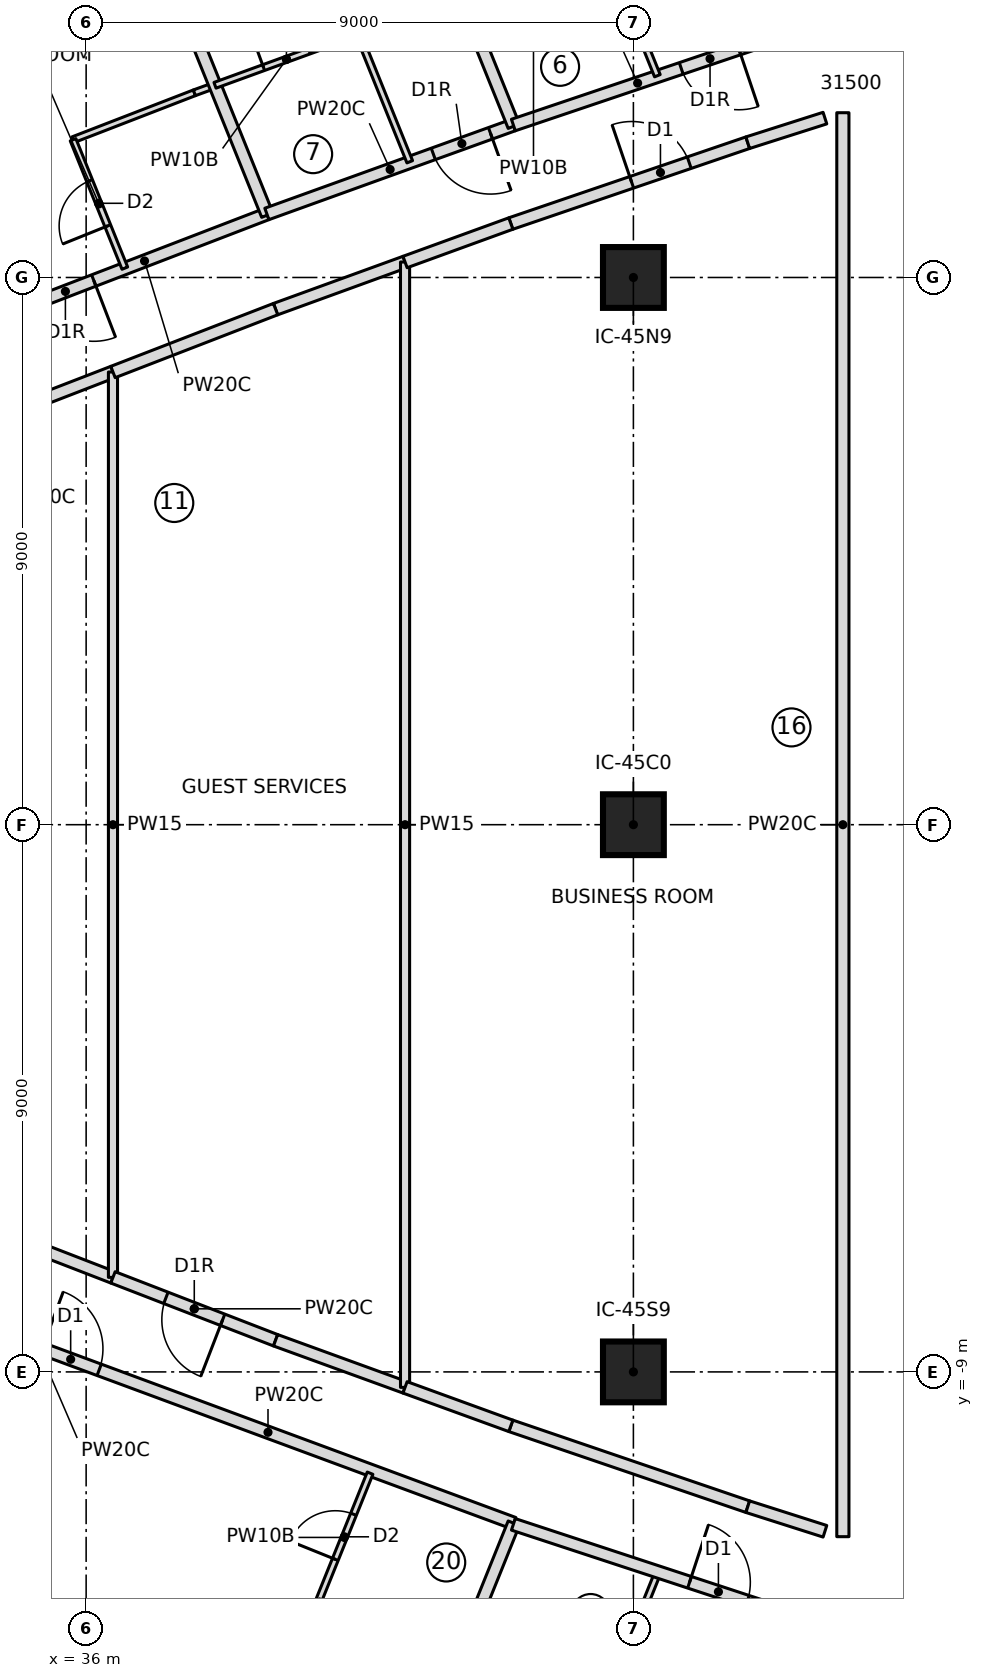
"""IFC4 building model, lengths in metres.
Left out: names, types, materials, properties, quantities, classifications, styles, units other than length and angle.
Written with IfcOpenShell. Run it as: python <this file> out.ifc"""

import sys

from ifc_helpers import new_model, si_unit, direction, frame, frame_2d, origin, origin_2d, place, context, subcontext, project, spatial, rectangle, extrude, element, fill, save


model = new_model("IFC4")
c1 = context("Model", 3, precision=1e-05, world=origin(), true_north=direction((0.0, 1.0)))
c2 = subcontext(c1, "Body", "Model", "MODEL_VIEW")
j1 = project(units=[si_unit("LENGTHUNIT", "METRE"), si_unit("PLANEANGLEUNIT", "RADIAN")], contexts=[c1])
p1 = place(None, origin())
s1 = spatial("IfcSite", under=j1, at=p1, CompositionType="ELEMENT")
p2 = place(p1, origin())
s2 = spatial("IfcBuilding", under=s1, at=p2, CompositionType="ELEMENT")
p3 = place(p2, frame((0.0, 0.0, 207.45)))
s3 = spatial("IfcBuildingStorey", under=s2, at=p3, CompositionType="ELEMENT", Elevation=207.45)
for number, where, z_axis, x_axis in (
    (1, (45.0, -9.0, 0.0), (0.0, 0.0, 1.0), (1.0, 0.0, 0.0)),
    (2, (45.0, 0.0, 0.0), (0.0, 0.0, 1.0), (1.0, 0.0, 0.0)),
    (3, (45.0, 9.0, 0.0), (0.0, 0.0, 1.0), (1.0, 0.0, 0.0)),
):
    element("IfcColumn", number, at=place(p3, frame(where, z_axis=z_axis, x_axis=x_axis)), inside=s3, PredefinedType="COLUMN", context=c2, shape_type="SweptSolid", body=[
        extrude(rectangle(XDim=1.0, YDim=1.0, at=origin_2d()), origin(), (0.0, 0.0, 1.0), 3.55),
    ])
p4 = place(p3, frame((38.972, 10.045, 0.0), z_axis=(0.0, 0.0, 1.0), x_axis=(-0.93335728106, -0.358948723208, 0.0)))
e4 = element("IfcWall", 4, at=p4, inside=s3, PredefinedType="PARTITIONING", context=c2, shape_type="SweptSolid", body=[
    extrude(rectangle(XDim=4.312, YDim=0.2, at=frame_2d((2.156, 0.0))), origin(), (0.0, 0.0, 1.0), 3.15),
])
p5 = place(p4, frame((3.05, 0.0, 0.0)))
e5 = element("IfcOpeningElement", 5, at=p5, cuts=e4, PredefinedType="OPENING", context=c2, shape_type="SweptSolid", body=[
    extrude(rectangle(XDim=1.0, YDim=2.1, at=frame_2d((0.5, 1.05))), frame((0.0, 0.11, 0.0), z_axis=(0.0, -1.0, 0.0), x_axis=(1.0, 0.0, 0.0)), (0.0, 0.0, 1.0), 0.22),
])
p6 = place(p3, frame((35.785, 11.266, 0.0), z_axis=(0.0, 0.0, 1.0), x_axis=(0.932673396793, 0.360721963448, 0.0)))
e6 = element("IfcWall", 6, at=p6, inside=s3, PredefinedType="PARTITIONING", context=c2, shape_type="SweptSolid", body=[
    extrude(rectangle(XDim=2.139, YDim=0.1, at=frame_2d((1.07, 0.0))), origin(), (0.0, 0.0, 1.0), 3.15),
])
p7 = place(p3, frame((37.78, 12.037, 0.0), z_axis=(0.0, 0.0, 1.0), x_axis=(0.939595761479, 0.34228614493, 0.0)))
e7 = element("IfcWall", 7, at=p7, inside=s3, PredefinedType="PARTITIONING", context=c2, shape_type="SweptSolid", body=[
    extrude(rectangle(XDim=0.361, YDim=0.1, at=frame_2d((0.18, 0.0))), origin(), (0.0, 0.0, 1.0), 3.15),
])
p8 = place(p3, frame((36.636, 9.154, 0.0), z_axis=(0.0, 0.0, 1.0), x_axis=(-0.373885031976, 0.927475057813, 0.0)))
e8 = element("IfcWall", 8, at=p8, inside=s3, PredefinedType="PARTITIONING", context=c2, shape_type="SweptSolid", body=[
    extrude(rectangle(XDim=2.277, YDim=0.1, at=frame_2d((1.138, 0.0))), origin(), (0.0, 0.0, 1.0), 3.15),
])
p9 = place(p8, frame((0.75, 0.0, 0.0)))
e9 = element("IfcOpeningElement", 9, at=p9, cuts=e8, PredefinedType="OPENING", context=c2, shape_type="SweptSolid", body=[
    extrude(rectangle(XDim=0.8, YDim=2.1, at=frame_2d((0.4, 1.05))), frame((0.0, 0.06, 0.0), z_axis=(0.0, -1.0, 0.0), x_axis=(1.0, 0.0, 0.0)), (0.0, 0.0, 1.0), 0.12),
])
p10 = place(p3, frame((38.98, 10.026, 0.0), z_axis=(0.0, 0.0, 1.0), x_axis=(-0.373863662938, 0.927483671843, 0.0)))
e10 = element("IfcWall", 10, at=p10, inside=s3, PredefinedType="PARTITIONING", context=c2, shape_type="SweptSolid", body=[
    extrude(rectangle(XDim=7.604, YDim=0.2, at=frame_2d((3.802, 0.0))), origin(), (0.0, 0.0, 1.0), 3.15),
])
p11 = place(p3, frame((43.026, 11.507, 0.0), z_axis=(0.0, 0.0, 1.0), x_axis=(-0.940653905433, -0.339367397069, 0.0)))
e11 = element("IfcWall", 11, at=p11, inside=s3, PredefinedType="PARTITIONING", context=c2, shape_type="SweptSolid", body=[
    extrude(rectangle(XDim=4.309, YDim=0.2, at=frame_2d((2.155, 0.0))), origin(), (0.0, 0.0, 1.0), 3.15),
])
p12 = place(p11, frame((0.4, 0.0, 0.0)))
e12 = element("IfcOpeningElement", 12, at=p12, cuts=e11, PredefinedType="OPENING", context=c2, shape_type="SweptSolid", body=[
    extrude(rectangle(XDim=1.0, YDim=2.1, at=frame_2d((0.5, 1.05))), frame((0.0, 0.11, 0.0), z_axis=(0.0, -1.0, 0.0), x_axis=(1.0, 0.0, 0.0)), (0.0, 0.0, 1.0), 0.22),
])
p13 = place(p3, frame((38.119, 12.161, 0.0), z_axis=(0.0, 0.0, 1.0), x_axis=(0.939744972593, 0.341876273652, 0.0)))
e13 = element("IfcWall", 13, at=p13, inside=s3, PredefinedType="PARTITIONING", context=c2, shape_type="SweptSolid", body=[
    extrude(rectangle(XDim=2.501, YDim=0.1, at=frame_2d((1.251, 0.0))), origin(), (0.0, 0.0, 1.0), 3.15),
])
p14 = place(p13, frame((0.85, 0.0, 0.0)))
e14 = element("IfcOpeningElement", 14, at=p14, cuts=e13, PredefinedType="OPENING", context=c2, shape_type="SweptSolid", body=[
    extrude(rectangle(XDim=0.8, YDim=2.1, at=frame_2d((0.4, 1.05))), frame((0.0, 0.06, 0.0), z_axis=(0.0, -1.0, 0.0), x_axis=(1.0, 0.0, 0.0)), (0.0, 0.0, 1.0), 0.12),
])
p15 = place(p3, frame((40.47, 13.016, 0.0), z_axis=(0.0, 0.0, 1.0), x_axis=(0.373846436826, -0.927490615409, 0.0)))
e15 = element("IfcWall", 15, at=p15, inside=s3, PredefinedType="PARTITIONING", context=c2, shape_type="SweptSolid", body=[
    extrude(rectangle(XDim=2.279, YDim=0.1, at=frame_2d((1.139, 0.0))), origin(), (0.0, 0.0, 1.0), 3.15),
])
p16 = place(p3, frame((43.033, 11.489, 0.0), z_axis=(0.0, 0.0, 1.0), x_axis=(-0.373877998371, 0.927477893178, 0.0)))
e16 = element("IfcWall", 16, at=p16, inside=s3, PredefinedType="PARTITIONING", context=c2, shape_type="SweptSolid", body=[
    extrude(rectangle(XDim=7.611, YDim=0.2, at=frame_2d((3.806, 0.0))), origin(), (0.0, 0.0, 1.0), 3.15),
])
p17 = place(p3, frame((47.113, 12.886, 0.0), z_axis=(0.0, 0.0, 1.0), x_axis=(-0.947550995841, -0.319604615549, 0.0)))
e17 = element("IfcWall", 17, at=p17, inside=s3, PredefinedType="PARTITIONING", context=c2, shape_type="SweptSolid", body=[
    extrude(rectangle(XDim=4.314, YDim=0.2, at=frame_2d((2.157, 0.0))), origin(), (0.0, 0.0, 1.0), 3.15),
])
p18 = place(p17, frame((0.4, 0.0, 0.0)))
e18 = element("IfcOpeningElement", 18, at=p18, cuts=e17, PredefinedType="OPENING", context=c2, shape_type="SweptSolid", body=[
    extrude(rectangle(XDim=1.0, YDim=2.1, at=frame_2d((0.5, 1.05))), frame((0.0, 0.11, 0.0), z_axis=(0.0, -1.0, 0.0), x_axis=(1.0, 0.0, 0.0)), (0.0, 0.0, 1.0), 0.22),
])
p19 = place(p3, frame((44.542, 14.434, 0.0), z_axis=(0.0, 0.0, 1.0), x_axis=(0.373917841166, -0.927461831052, 0.0)))
e19 = element("IfcWall", 19, at=p19, inside=s3, PredefinedType="PARTITIONING", context=c2, shape_type="SweptSolid", body=[
    extrude(rectangle(XDim=2.281, YDim=0.1, at=frame_2d((1.14, 0.0))), origin(), (0.0, 0.0, 1.0), 3.15),
])
p20 = place(p3, frame((34.948, -8.497, 0.0), z_axis=(0.0, 0.0, 1.0), x_axis=(0.937864515454, -0.347001657996, 0.0)))
e20 = element("IfcWall", 20, at=p20, inside=s3, PredefinedType="PARTITIONING", context=c2, shape_type="SweptSolid", body=[
    extrude(rectangle(XDim=8.621, YDim=0.2, at=frame_2d((4.311, 0.0))), origin(), (0.0, 0.0, 1.0), 3.15),
])
p21 = place(p20, frame((0.35, 0.0, 0.0)))
e21 = element("IfcOpeningElement", 21, at=p21, cuts=e20, PredefinedType="OPENING", context=c2, shape_type="SweptSolid", body=[
    extrude(rectangle(XDim=1.0, YDim=2.1, at=frame_2d((0.5, 1.05))), frame((0.0, 0.11, 0.0), z_axis=(0.0, -1.0, 0.0), x_axis=(1.0, 0.0, 0.0)), (0.0, 0.0, 1.0), 0.22),
])
p22 = place(p3, frame((39.818, -12.779, 0.0), z_axis=(0.0, 0.0, 1.0), x_axis=(0.373883593317, 0.927475637765, 0.0)))
e22 = element("IfcWall", 22, at=p22, inside=s3, PredefinedType="PARTITIONING", context=c2, shape_type="SweptSolid", body=[
    extrude(rectangle(XDim=2.278, YDim=0.1, at=frame_2d((1.139, 0.0))), origin(), (0.0, 0.0, 1.0), 3.15),
])
p23 = place(p22, frame((0.75, 0.0, 0.0)))
e23 = element("IfcOpeningElement", 23, at=p23, cuts=e22, PredefinedType="OPENING", context=c2, shape_type="SweptSolid", body=[
    extrude(rectangle(XDim=0.8, YDim=2.1, at=frame_2d((0.4, 1.05))), frame((0.0, 0.06, 0.0), z_axis=(0.0, -1.0, 0.0), x_axis=(1.0, 0.0, 0.0)), (0.0, 0.0, 1.0), 0.12),
])
p24 = place(p3, frame((40.188, -18.548, 0.0), z_axis=(0.0, 0.0, 1.0), x_axis=(0.373877998371, 0.927477893178, 0.0)))
e24 = element("IfcWall", 24, at=p24, inside=s3, PredefinedType="PARTITIONING", context=c2, shape_type="SweptSolid", body=[
    extrude(rectangle(XDim=7.611, YDim=0.2, at=frame_2d((3.806, 0.0))), origin(), (0.0, 0.0, 1.0), 3.15),
])
p25 = place(p3, frame((45.395, -12.318, 0.0), z_axis=(0.0, 0.0, 1.0), x_axis=(-0.373917841166, -0.927461831052, 0.0)))
e25 = element("IfcWall", 25, at=p25, inside=s3, PredefinedType="PARTITIONING", context=c2, shape_type="SweptSolid", body=[
    extrude(rectangle(XDim=2.281, YDim=0.1, at=frame_2d((1.14, 0.0))), origin(), (0.0, 0.0, 1.0), 3.15),
])
for number, where, z_axis, x_axis in (
    (26, (35.276, 6.994, 0.0), (0.0, 0.0, 1.0), (0.933, 0.361, 0.0)),
    (27, (36.441, -7.445, 0.0), (0.0, 0.0, 1.0), (-0.933, 0.361, 0.0)),
):
    element("IfcWall", number, at=place(p3, frame(where, z_axis=z_axis, x_axis=x_axis)), inside=s3, PredefinedType="PARTITIONING", context=c2, shape_type="SweptSolid", body=[
        extrude(rectangle(XDim=1.25, YDim=0.2, at=frame_2d((0.625, 0.0))), origin(), (0.0, 0.0, 1.0), 3.15),
    ])
p26 = place(p3, frame((36.441, -7.445, 0.0), z_axis=(0.0, 0.0, 1.0), x_axis=(0.0, 1.0, 0.0)))
e28 = element("IfcWall", 28, at=p26, inside=s3, PredefinedType="PARTITIONING", context=c2, shape_type="SweptSolid", body=[
    extrude(rectangle(XDim=14.89, YDim=0.15, at=frame_2d((7.445, 0.0))), origin(), (0.0, 0.0, 1.0), 3.15),
])
p27 = place(p3, frame((39.115, -8.479, 0.0), z_axis=(0.0, 0.0, 1.0), x_axis=(-0.932650373077, 0.36078148733, 0.0)))
e29 = element("IfcWall", 29, at=p27, inside=s3, PredefinedType="PARTITIONING", context=c2, shape_type="SweptSolid", body=[
    extrude(rectangle(XDim=2.867, YDim=0.2, at=frame_2d((1.434, 0.0))), origin(), (0.0, 0.0, 1.0), 3.15),
])
p28 = place(p27, frame((0.934, 0.0, 0.0)))
e30 = element("IfcOpeningElement", 30, at=p28, cuts=e29, PredefinedType="OPENING", context=c2, shape_type="SweptSolid", body=[
    extrude(rectangle(XDim=1.0, YDim=2.1, at=frame_2d((0.5, 1.05))), frame((0.0, 0.11, 0.0), z_axis=(0.0, -1.0, 0.0), x_axis=(1.0, 0.0, 0.0)), (0.0, 0.0, 1.0), 0.22),
])
for number, where, z_axis, x_axis in (
    (31, (39.115, 8.479, 0.0), (0.0, 0.0, 1.0), (0.94, 0.342, 0.0)),
    (32, (41.245, -9.254, 0.0), (0.0, 0.0, 1.0), (-0.94, 0.342, 0.0)),
):
    element("IfcWall", number, at=place(p3, frame(where, z_axis=z_axis, x_axis=x_axis)), inside=s3, PredefinedType="PARTITIONING", context=c2, shape_type="SweptSolid", body=[
        extrude(rectangle(XDim=2.266, YDim=0.2, at=frame_2d((1.133, 0.0))), origin(), (0.0, 0.0, 1.0), 3.15),
    ])
p29 = place(p3, frame((36.441, 7.445, 0.0), z_axis=(0.0, 0.0, 1.0), x_axis=(0.932650373077, 0.36078148733, 0.0)))
e33 = element("IfcWall", 33, at=p29, inside=s3, PredefinedType="PARTITIONING", context=c2, shape_type="SweptSolid", body=[
    extrude(rectangle(XDim=2.867, YDim=0.2, at=frame_2d((1.434, 0.0))), origin(), (0.0, 0.0, 1.0), 3.15),
])
p30 = place(p3, frame((41.245, -9.254, 0.0), z_axis=(0.0, 0.0, 1.0), x_axis=(0.0, 1.0, 0.0)))
e34 = element("IfcWall", 34, at=p30, inside=s3, PredefinedType="PARTITIONING", context=c2, shape_type="SweptSolid", body=[
    extrude(rectangle(XDim=18.508, YDim=0.15, at=frame_2d((9.254, 0.0))), origin(), (0.0, 0.0, 1.0), 3.15),
])
p31 = place(p3, frame((42.984, 9.887, 0.0), z_axis=(0.0, 0.0, 1.0), x_axis=(0.946436071896, 0.322891253852, 0.0)))
e35 = element("IfcWall", 35, at=p31, inside=s3, PredefinedType="PARTITIONING", context=c2, shape_type="SweptSolid", body=[
    extrude(rectangle(XDim=4.117, YDim=0.2, at=frame_2d((2.059, 0.0))), origin(), (0.0, 0.0, 1.0), 3.15),
])
p32 = place(p31, frame((2.1, 0.0, 0.0)))
e36 = element("IfcOpeningElement", 36, at=p32, cuts=e35, PredefinedType="OPENING", context=c2, shape_type="SweptSolid", body=[
    extrude(rectangle(XDim=1.0, YDim=2.1, at=frame_2d((0.5, 1.05))), frame((0.0, 0.11, 0.0), z_axis=(0.0, -1.0, 0.0), x_axis=(1.0, 0.0, 0.0)), (0.0, 0.0, 1.0), 0.22),
])
p33 = place(p3, frame((46.881, -11.217, 0.0), z_axis=(0.0, 0.0, 1.0), x_axis=(-0.946436071896, 0.322891253852, 0.0)))
e37 = element("IfcWall", 37, at=p33, inside=s3, PredefinedType="PARTITIONING", context=c2, shape_type="SweptSolid", body=[
    extrude(rectangle(XDim=4.117, YDim=0.2, at=frame_2d((2.059, 0.0))), origin(), (0.0, 0.0, 1.0), 3.15),
])
for number, where, z_axis, x_axis in (
    (38, (42.984, -9.887, 0.0), (0.0, 0.0, 1.0), (-0.94, 0.342, 0.0)),
    (39, (41.245, 9.254, 0.0), (0.0, 0.0, 1.0), (0.94, 0.342, 0.0)),
):
    element("IfcWall", number, at=place(p3, frame(where, z_axis=z_axis, x_axis=x_axis)), inside=s3, PredefinedType="PARTITIONING", context=c2, shape_type="SweptSolid", body=[
        extrude(rectangle(XDim=1.851, YDim=0.2, at=frame_2d((0.926, 0.0))), origin(), (0.0, 0.0, 1.0), 3.15),
    ])
p34 = place(p3, frame((43.026, -11.507, 0.0), z_axis=(0.0, 0.0, 1.0), x_axis=(0.949951949432, -0.312396052744, 0.0)))
e40 = element("IfcWall", 40, at=p34, inside=s3, PredefinedType="PARTITIONING", context=c2, shape_type="SweptSolid", body=[
    extrude(rectangle(XDim=5.394, YDim=0.2, at=frame_2d((2.697, 0.0))), origin(), (0.0, 0.0, 1.0), 3.15),
])
p35 = place(p34, frame((3.05, 0.0, 0.0)))
e41 = element("IfcOpeningElement", 41, at=p35, cuts=e40, PredefinedType="OPENING", context=c2, shape_type="SweptSolid", body=[
    extrude(rectangle(XDim=1.0, YDim=2.1, at=frame_2d((0.5, 1.05))), frame((0.0, 0.11, 0.0), z_axis=(0.0, -1.0, 0.0), x_axis=(1.0, 0.0, 0.0)), (0.0, 0.0, 1.0), 0.22),
])
for number, where, z_axis, x_axis in (
    (42, (46.881, 11.217, 0.0), (0.0, 0.0, 1.0), (0.953, 0.304, 0.0)),
    (43, (48.15, -11.621, 0.0), (0.0, 0.0, 1.0), (-0.953, 0.304, 0.0)),
):
    element("IfcWall", number, at=place(p3, frame(where, z_axis=z_axis, x_axis=x_axis)), inside=s3, PredefinedType="PARTITIONING", context=c2, shape_type="SweptSolid", body=[
        extrude(rectangle(XDim=1.332, YDim=0.2, at=frame_2d((0.666, 0.0))), origin(), (0.0, 0.0, 1.0), 3.15),
    ])
p36 = place(p3, frame((48.445, 11.71, 0.0), z_axis=(0.0, 0.0, 1.0), x_axis=(0.0, -1.0, 0.0)))
e44 = element("IfcWall", 44, at=p36, inside=s3, PredefinedType="PARTITIONING", context=c2, shape_type="SweptSolid", body=[
    extrude(rectangle(XDim=23.42, YDim=0.2, at=frame_2d((11.71, 0.0))), origin(), (0.0, 0.0, 1.0), 3.15),
])
p37 = place(p9, origin())
e45 = element("IfcDoor", 45, at=p37, inside=s3, OperationType="SINGLE_SWING_LEFT", PredefinedType="DOOR", context=c2, shape_type="SweptSolid", body=[
    extrude(rectangle(XDim=0.8, YDim=2.1, at=frame_2d((0.4, 1.05))), frame((0.0, 0.025, 0.0), z_axis=(0.0, -1.0, 0.0), x_axis=(1.0, 0.0, 0.0)), (0.0, 0.0, 1.0), 0.05),
])
fill(e9, e45)
p38 = place(p5, origin())
e46 = element("IfcDoor", 46, at=p38, inside=s3, OperationType="SINGLE_SWING_RIGHT", PredefinedType="DOOR", context=c2, shape_type="SweptSolid", body=[
    extrude(rectangle(XDim=1.0, YDim=2.1, at=frame_2d((0.5, 1.05))), frame((0.0, 0.025, 0.0), z_axis=(0.0, -1.0, 0.0), x_axis=(1.0, 0.0, 0.0)), (0.0, 0.0, 1.0), 0.05),
])
fill(e5, e46)
p39 = place(p14, origin())
e47 = element("IfcDoor", 47, at=p39, inside=s3, OperationType="SINGLE_SWING_LEFT", PredefinedType="DOOR", context=c2, shape_type="SweptSolid", body=[
    extrude(rectangle(XDim=0.8, YDim=2.1, at=frame_2d((0.4, 1.05))), frame((0.0, 0.025, 0.0), z_axis=(0.0, -1.0, 0.0), x_axis=(1.0, 0.0, 0.0)), (0.0, 0.0, 1.0), 0.05),
])
fill(e14, e47)
p40 = place(p12, origin())
e48 = element("IfcDoor", 48, at=p40, inside=s3, OperationType="SINGLE_SWING_RIGHT", PredefinedType="DOOR", context=c2, shape_type="SweptSolid", body=[
    extrude(rectangle(XDim=1.0, YDim=2.1, at=frame_2d((0.5, 1.05))), frame((0.0, 0.025, 0.0), z_axis=(0.0, -1.0, 0.0), x_axis=(1.0, 0.0, 0.0)), (0.0, 0.0, 1.0), 0.05),
])
fill(e12, e48)
p41 = place(p18, origin())
e49 = element("IfcDoor", 49, at=p41, inside=s3, OperationType="SINGLE_SWING_RIGHT", PredefinedType="DOOR", context=c2, shape_type="SweptSolid", body=[
    extrude(rectangle(XDim=1.0, YDim=2.1, at=frame_2d((0.5, 1.05))), frame((0.0, 0.025, 0.0), z_axis=(0.0, -1.0, 0.0), x_axis=(1.0, 0.0, 0.0)), (0.0, 0.0, 1.0), 0.05),
])
fill(e18, e49)
p42 = place(p23, origin())
e50 = element("IfcDoor", 50, at=p42, inside=s3, OperationType="SINGLE_SWING_LEFT", PredefinedType="DOOR", context=c2, shape_type="SweptSolid", body=[
    extrude(rectangle(XDim=0.8, YDim=2.1, at=frame_2d((0.4, 1.05))), frame((0.0, 0.025, 0.0), z_axis=(0.0, -1.0, 0.0), x_axis=(1.0, 0.0, 0.0)), (0.0, 0.0, 1.0), 0.05),
])
fill(e23, e50)
p43 = place(p21, origin())
e51 = element("IfcDoor", 51, at=p43, inside=s3, OperationType="SINGLE_SWING_LEFT", PredefinedType="DOOR", context=c2, shape_type="SweptSolid", body=[
    extrude(rectangle(XDim=1.0, YDim=2.1, at=frame_2d((0.5, 1.05))), frame((0.0, 0.025, 0.0), z_axis=(0.0, -1.0, 0.0), x_axis=(1.0, 0.0, 0.0)), (0.0, 0.0, 1.0), 0.05),
])
fill(e21, e51)
p44 = place(p35, origin())
e52 = element("IfcDoor", 52, at=p44, inside=s3, OperationType="SINGLE_SWING_LEFT", PredefinedType="DOOR", context=c2, shape_type="SweptSolid", body=[
    extrude(rectangle(XDim=1.0, YDim=2.1, at=frame_2d((0.5, 1.05))), frame((0.0, 0.025, 0.0), z_axis=(0.0, -1.0, 0.0), x_axis=(1.0, 0.0, 0.0)), (0.0, 0.0, 1.0), 0.05),
])
fill(e41, e52)
p45 = place(p28, origin())
e53 = element("IfcDoor", 53, at=p45, inside=s3, OperationType="SINGLE_SWING_RIGHT", PredefinedType="DOOR", context=c2, shape_type="SweptSolid", body=[
    extrude(rectangle(XDim=1.0, YDim=2.1, at=frame_2d((0.5, 1.05))), frame((0.0, 0.025, 0.0), z_axis=(0.0, -1.0, 0.0), x_axis=(1.0, 0.0, 0.0)), (0.0, 0.0, 1.0), 0.05),
])
fill(e30, e53)
p46 = place(p32, origin())
e54 = element("IfcDoor", 54, at=p46, inside=s3, OperationType="SINGLE_SWING_LEFT", PredefinedType="DOOR", context=c2, shape_type="SweptSolid", body=[
    extrude(rectangle(XDim=1.0, YDim=2.1, at=frame_2d((0.5, 1.05))), frame((0.0, 0.025, 0.0), z_axis=(0.0, -1.0, 0.0), x_axis=(1.0, 0.0, 0.0)), (0.0, 0.0, 1.0), 0.05),
])
fill(e36, e54)
save(model, sys.argv[1])
